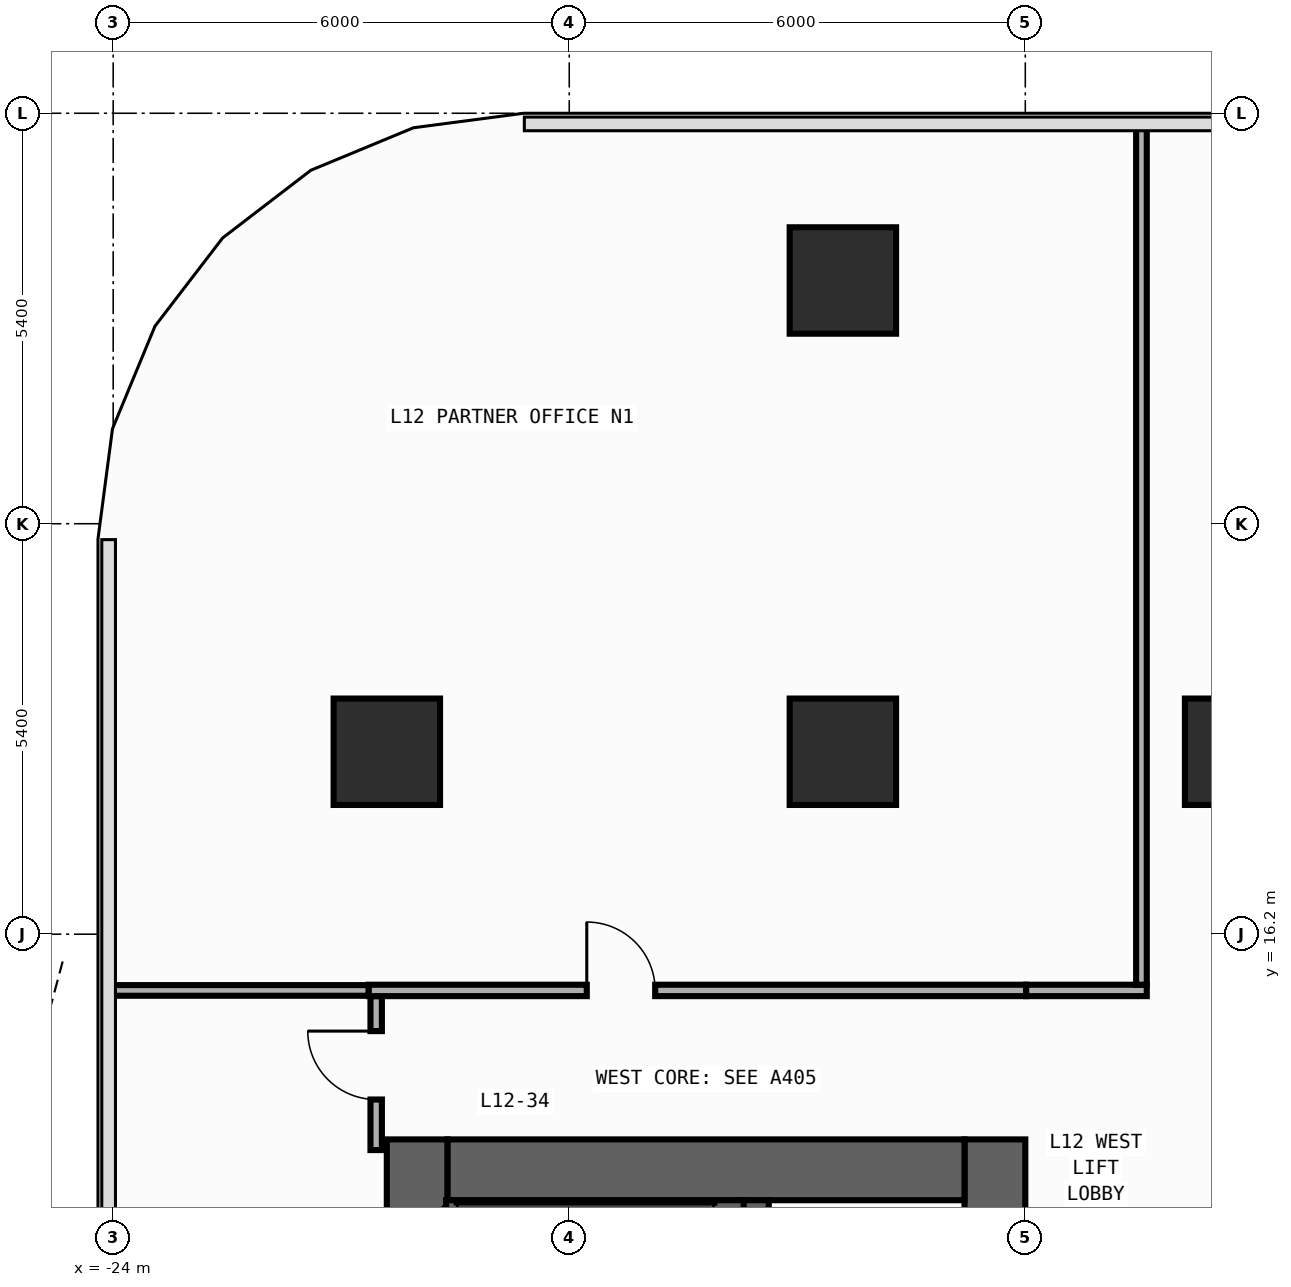
"""IFC4 building model, lengths in metres.
Left out: names, types, materials, properties, quantities, classifications, styles, units other than length and angle.
Written with IfcOpenShell. Run it as: python <this file> out.ifc"""

import sys

from ifc_helpers import new_model, si_unit, direction, frame, frame_2d, origin, origin_2d, place, context, subcontext, project, spatial, rectangle, extrude, element, fill, save


model = new_model("IFC4")
c1 = context("Model", 3, precision=1e-05, world=origin(), true_north=direction((0.0, 1.0)))
c2 = subcontext(c1, "Body", "Model", "MODEL_VIEW")
j1 = project(units=[si_unit("LENGTHUNIT", "METRE"), si_unit("PLANEANGLEUNIT", "RADIAN")], contexts=[c1])
p1 = place(None, origin())
s1 = spatial("IfcSite", under=j1, at=p1, CompositionType="ELEMENT")
p2 = place(p1, origin())
s2 = spatial("IfcBuilding", under=s1, at=p2, CompositionType="ELEMENT")
p3 = place(p2, frame((0.0, 0.0, 51.2)))
s3 = spatial("IfcBuildingStorey", under=s2, at=p3, CompositionType="ELEMENT", Elevation=51.2)
p4 = place(p3, frame((-20.0, -13.5, 0.0), z_axis=(0.0, 0.0, 1.0), x_axis=(0.0, 1.0, 0.0)))
e1 = element("IfcWall", 1, at=p4, inside=s3, PredefinedType="SHEAR", context=c2, shape_type="SweptSolid", body=[
    extrude(rectangle(XDim=27.0, YDim=0.8, at=frame_2d((13.5, 0.0))), origin(), (0.0, 0.0, 1.0), 3.94),
])
p5 = place(p3, frame((-12.4, -13.5, 0.0), z_axis=(0.0, 0.0, 1.0), x_axis=(0.0, 1.0, 0.0)))
e2 = element("IfcWall", 2, at=p5, inside=s3, PredefinedType="SHEAR", context=c2, shape_type="SweptSolid", body=[
    extrude(rectangle(XDim=27.0, YDim=0.8, at=frame_2d((13.5, 0.0))), origin(), (0.0, 0.0, 1.0), 3.94),
])
p6 = place(p5, frame((21.55, 0.0, 0.0)))
e3 = element("IfcOpeningElement", 3, at=p6, cuts=e2, PredefinedType="OPENING", context=c2, shape_type="SweptSolid", body=[
    extrude(rectangle(XDim=1.1, YDim=2.2, at=frame_2d((0.55, 1.1))), frame((0.0, 0.41, 0.0), z_axis=(0.0, -1.0, 0.0), x_axis=(1.0, 0.0, 0.0)), (0.0, 0.0, 1.0), 0.82),
])
p7 = place(p5, frame((18.35, 0.0, 0.0)))
e4 = element("IfcOpeningElement", 4, at=p7, cuts=e2, PredefinedType="OPENING", context=c2, shape_type="SweptSolid", body=[
    extrude(rectangle(XDim=1.1, YDim=2.2, at=frame_2d((0.55, 1.1))), frame((0.0, 0.41, 0.0), z_axis=(0.0, -1.0, 0.0), x_axis=(1.0, 0.0, 0.0)), (0.0, 0.0, 1.0), 0.82),
])
p8 = place(p5, frame((15.15, 0.0, 0.0)))
e5 = element("IfcOpeningElement", 5, at=p8, cuts=e2, PredefinedType="OPENING", context=c2, shape_type="SweptSolid", body=[
    extrude(rectangle(XDim=1.1, YDim=2.2, at=frame_2d((0.55, 1.1))), frame((0.0, 0.41, 0.0), z_axis=(0.0, -1.0, 0.0), x_axis=(1.0, 0.0, 0.0)), (0.0, 0.0, 1.0), 0.82),
])
p9 = place(p5, frame((10.35, 0.0, 0.0)))
e6 = element("IfcOpeningElement", 6, at=p9, cuts=e2, PredefinedType="OPENING", context=c2, shape_type="SweptSolid", body=[
    extrude(rectangle(XDim=1.1, YDim=2.2, at=frame_2d((0.55, 1.1))), frame((0.0, 0.41, 0.0), z_axis=(0.0, -1.0, 0.0), x_axis=(1.0, 0.0, 0.0)), (0.0, 0.0, 1.0), 0.82),
])
p10 = place(p5, frame((7.15, 0.0, 0.0)))
e7 = element("IfcOpeningElement", 7, at=p10, cuts=e2, PredefinedType="OPENING", context=c2, shape_type="SweptSolid", body=[
    extrude(rectangle(XDim=1.1, YDim=2.2, at=frame_2d((0.55, 1.1))), frame((0.0, 0.41, 0.0), z_axis=(0.0, -1.0, 0.0), x_axis=(1.0, 0.0, 0.0)), (0.0, 0.0, 1.0), 0.82),
])
p11 = place(p5, frame((3.95, 0.0, 0.0)))
e8 = element("IfcOpeningElement", 8, at=p11, cuts=e2, PredefinedType="OPENING", context=c2, shape_type="SweptSolid", body=[
    extrude(rectangle(XDim=1.1, YDim=2.2, at=frame_2d((0.55, 1.1))), frame((0.0, 0.41, 0.0), z_axis=(0.0, -1.0, 0.0), x_axis=(1.0, 0.0, 0.0)), (0.0, 0.0, 1.0), 0.82),
])
p12 = place(p5, frame((12.725, 0.0, 0.0)))
e9 = element("IfcOpeningElement", 9, at=p12, cuts=e2, PredefinedType="OPENING", context=c2, shape_type="SweptSolid", body=[
    extrude(rectangle(XDim=1.15, YDim=2.2, at=frame_2d((0.575, 1.1))), frame((0.0, 0.41, 0.0), z_axis=(0.0, -1.0, 0.0), x_axis=(1.0, 0.0, 0.0)), (0.0, 0.0, 1.0), 0.82),
])
p13 = place(p5, frame((1.625, 0.0, 0.0)))
e10 = element("IfcOpeningElement", 10, at=p13, cuts=e2, PredefinedType="OPENING", context=c2, shape_type="SweptSolid", body=[
    extrude(rectangle(XDim=0.85, YDim=2.1, at=frame_2d((0.425, 1.05))), frame((0.0, 0.41, 0.0), z_axis=(0.0, -1.0, 0.0), x_axis=(1.0, 0.0, 0.0)), (0.0, 0.0, 1.0), 0.82),
])
p14 = place(p3, frame((-19.6, 13.1, 0.0), z_axis=(0.0, 0.0, 1.0), x_axis=(1.0, 0.0, 0.0)))
e11 = element("IfcWall", 11, at=p14, inside=s3, PredefinedType="SHEAR", context=c2, shape_type="SweptSolid", body=[
    extrude(rectangle(XDim=6.8, YDim=0.8, at=frame_2d((3.4, 0.0))), origin(), (0.0, 0.0, 1.0), 3.94),
])
p15 = place(p3, frame((-15.55, -12.7, 0.0), z_axis=(0.0, 0.0, 1.0), x_axis=(0.0, 1.0, 0.0)))
e12 = element("IfcWall", 12, at=p15, inside=s3, PredefinedType="SHEAR", context=c2, shape_type="SweptSolid", body=[
    extrude(rectangle(XDim=25.4, YDim=0.35, at=frame_2d((12.7, 0.0))), origin(), (0.0, 0.0, 1.0), 3.94),
])
p16 = place(p15, frame((11.925, 0.0, 0.0)))
e13 = element("IfcOpeningElement", 13, at=p16, cuts=e12, PredefinedType="OPENING", context=c2, shape_type="SweptSolid", body=[
    extrude(rectangle(XDim=1.15, YDim=2.2, at=frame_2d((0.575, 1.1))), frame((0.0, 0.185, 0.0), z_axis=(0.0, -1.0, 0.0), x_axis=(1.0, 0.0, 0.0)), (0.0, 0.0, 1.0), 0.37),
])
p17 = place(p15, frame((0.825, 0.0, 0.0)))
e14 = element("IfcOpeningElement", 14, at=p17, cuts=e12, PredefinedType="OPENING", context=c2, shape_type="SweptSolid", body=[
    extrude(rectangle(XDim=0.85, YDim=2.1, at=frame_2d((0.425, 1.05))), frame((0.0, 0.185, 0.0), z_axis=(0.0, -1.0, 0.0), x_axis=(1.0, 0.0, 0.0)), (0.0, 0.0, 1.0), 0.37),
])
p18 = place(p3, frame((-19.62, 12.59, 0.0), z_axis=(0.0, 0.0, 1.0), x_axis=(1.0, 0.0, 0.0)))
e15 = element("IfcWall", 15, at=p18, inside=s3, PredefinedType="SHEAR", context=c2, shape_type="SweptSolid", body=[
    extrude(rectangle(XDim=3.915, YDim=0.22, at=frame_2d((1.958, 0.0))), origin(), (0.0, 0.0, 1.0), 3.94),
])
for number, where, z_axis, x_axis in (
    (16, (-9.2, 18.6, 0.0), (0.0, 0.0, 1.0), (1.0, 0.0, 0.0)),
    (17, (-20.4, 18.6, 0.0), (0.0, 0.0, 1.0), (1.0, 0.0, 0.0)),
    (18, (-14.4, 18.6, 0.0), (0.0, 0.0, 1.0), (1.0, 0.0, 0.0)),
    (19, (-14.4, 24.8, 0.0), (0.0, 0.0, 1.0), (1.0, 0.0, 0.0)),
):
    element("IfcColumn", number, at=place(p3, frame(where, z_axis=z_axis, x_axis=x_axis)), inside=s3, PredefinedType="COLUMN", context=c2, shape_type="SweptSolid", body=[
        extrude(rectangle(XDim=1.4, YDim=1.4, at=origin_2d()), origin(), (0.0, 0.0, 1.0), 4.2),
    ])
p19 = place(p3, frame((-11.99, 15.46, 0.0), z_axis=(0.0, 0.0, 1.0), x_axis=(1.0, 0.0, 0.0)))
e20 = element("IfcWall", 20, at=p19, inside=s3, PredefinedType="PARTITIONING", context=c2, shape_type="SweptSolid", body=[
    extrude(rectangle(XDim=1.588, YDim=0.15, at=frame_2d((0.794, 0.0))), origin(), (0.0, 0.0, 1.0), 3.94),
])
p20 = place(p3, frame((-20.54, 13.36, 0.0), z_axis=(0.0, 0.0, 1.0), x_axis=(0.0, 1.0, 0.0)))
e21 = element("IfcWall", 21, at=p20, inside=s3, PredefinedType="PARTITIONING", context=c2, shape_type="SweptSolid", body=[
    extrude(rectangle(XDim=2.025, YDim=0.15, at=frame_2d((1.012, 0.0))), origin(), (0.0, 0.0, 1.0), 3.94),
])
p21 = place(p20, frame((0.665, 0.0, 0.0)))
e22 = element("IfcOpeningElement", 22, at=p21, cuts=e21, PredefinedType="OPENING", context=c2, shape_type="SweptSolid", body=[
    extrude(rectangle(XDim=0.9, YDim=2.15, at=frame_2d((0.45, 1.075))), frame((0.0, 0.085, 0.0), z_axis=(0.0, -1.0, 0.0), x_axis=(1.0, 0.0, 0.0)), (0.0, 0.0, 1.0), 0.17),
])
p22 = place(p3, frame((-20.64, 15.46, 0.0), z_axis=(0.0, 0.0, 1.0), x_axis=(1.0, 0.0, 0.0)))
e23 = element("IfcWall", 23, at=p22, inside=s3, PredefinedType="PARTITIONING", context=c2, shape_type="SweptSolid", body=[
    extrude(rectangle(XDim=8.65, YDim=0.15, at=frame_2d((4.325, 0.0))), origin(), (0.0, 0.0, 1.0), 3.94),
])
p23 = place(p22, frame((2.871, 0.0, 0.0)))
e24 = element("IfcOpeningElement", 24, at=p23, cuts=e23, PredefinedType="OPENING", context=c2, shape_type="SweptSolid", body=[
    extrude(rectangle(XDim=0.9, YDim=2.15, at=frame_2d((0.45, 1.075))), frame((0.0, 0.085, 0.0), z_axis=(0.0, -1.0, 0.0), x_axis=(1.0, 0.0, 0.0)), (0.0, 0.0, 1.0), 0.17),
])
p24 = place(p3, frame((-24.055, 15.46, 0.0), z_axis=(0.0, 0.0, 1.0), x_axis=(1.0, 0.0, 0.0)))
e25 = element("IfcWall", 25, at=p24, inside=s3, PredefinedType="PARTITIONING", context=c2, shape_type="SweptSolid", body=[
    extrude(rectangle(XDim=3.415, YDim=0.14, at=frame_2d((1.708, 0.0))), origin(), (0.0, 0.0, 1.0), 3.94),
])
p25 = place(p3, frame((-10.472, 15.535, 0.0), z_axis=(0.0, 0.0, 1.0), x_axis=(0.0, 1.0, 0.0)))
e26 = element("IfcWall", 26, at=p25, inside=s3, PredefinedType="PARTITIONING", context=c2, shape_type="SweptSolid", body=[
    extrude(rectangle(XDim=11.32, YDim=0.14, at=frame_2d((5.66, 0.0))), origin(), (0.0, 0.0, 1.0), 3.94),
])
p26 = place(p21, origin())
e27 = element("IfcDoor", 27, at=p26, inside=s3, OperationType="SINGLE_SWING_RIGHT", PredefinedType="DOOR", context=c2, shape_type="SweptSolid", body=[
    extrude(rectangle(XDim=0.9, YDim=2.15, at=frame_2d((0.45, 1.075))), frame((0.0, 0.025, 0.0), z_axis=(0.0, -1.0, 0.0), x_axis=(1.0, 0.0, 0.0)), (0.0, 0.0, 1.0), 0.05),
])
fill(e22, e27)
p27 = place(p23, origin())
e28 = element("IfcDoor", 28, at=p27, inside=s3, OperationType="SINGLE_SWING_LEFT", PredefinedType="DOOR", context=c2, shape_type="SweptSolid", body=[
    extrude(rectangle(XDim=0.9, YDim=2.15, at=frame_2d((0.45, 1.075))), frame((0.0, 0.025, 0.0), z_axis=(0.0, -1.0, 0.0), x_axis=(1.0, 0.0, 0.0)), (0.0, 0.0, 1.0), 0.05),
])
fill(e24, e28)
save(model, sys.argv[1])
